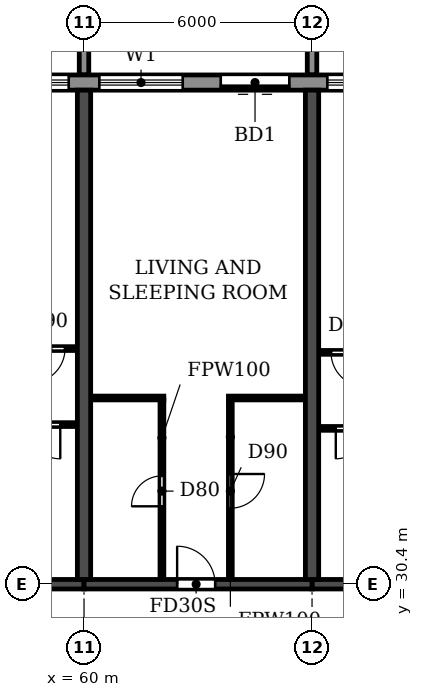
"""IFC4 building model, lengths in metres.
Left out: names, types, materials, properties, quantities, classifications, styles, units other than length and angle.
Written with IfcOpenShell. Run it as: python <this file> out.ifc"""

import sys

from ifc_helpers import new_model, si_unit, direction, frame, frame_2d, origin, place, context, subcontext, project, spatial, polyline, rectangle, outline, extrude, source, transform, mapped, element, fill, save


model = new_model("IFC4")
c1 = context("Model", 3, precision=1e-05, world=origin(), true_north=direction((0.0, 1.0)))
c2 = subcontext(c1, "Body", "Model", "MODEL_VIEW")
j1 = project(units=[si_unit("LENGTHUNIT", "METRE"), si_unit("PLANEANGLEUNIT", "RADIAN")], contexts=[c1])
p1 = place(None, origin())
s1 = spatial("IfcSite", under=j1, at=p1, CompositionType="ELEMENT")
p2 = place(p1, origin())
s2 = spatial("IfcBuilding", under=s1, at=p2, CompositionType="ELEMENT")
p3 = place(p2, frame((0.0, 0.0, 109.2)))
s3 = spatial("IfcBuildingStorey", under=s2, at=p3, CompositionType="ELEMENT", Elevation=109.2)
for number, where, z_axis, x_axis in (
    (1, (60.0, 30.525, 0.0), (0.0, 0.0, 1.0), (0.0, 1.0, 0.0)),
    (2, (66.0, 30.525, 0.0), (0.0, 0.0, 1.0), (0.0, 1.0, 0.0)),
):
    element("IfcWall", number, at=place(p3, frame(where, z_axis=z_axis, x_axis=x_axis)), inside=s3, PredefinedType="SHEAR", context=c2, shape_type="SweptSolid", body=[
        extrude(rectangle(XDim=12.875, YDim=0.35, at=frame_2d((6.438, 0.0))), origin(), (0.0, 0.0, 1.0), 3.06),
    ])
p4 = place(p3, frame((54.0, 30.4, 0.0), z_axis=(0.0, 0.0, 1.0), x_axis=(1.0, 0.0, 0.0)))
e3 = element("IfcWall", 3, at=p4, inside=s3, PredefinedType="SHEAR", context=c2, shape_type="SweptSolid", body=[
    extrude(rectangle(XDim=6.0, YDim=0.25, at=frame_2d((3.0, 0.0))), origin(), (0.0, 0.0, 1.0), 2.46),
])
p5 = place(p4, frame((2.45, 0.0, 0.0)))
e4 = element("IfcOpeningElement", 4, at=p5, cuts=e3, PredefinedType="OPENING", context=c2, shape_type="SweptSolid", body=[
    extrude(rectangle(XDim=1.0, YDim=2.1, at=frame_2d((0.5, 1.05))), frame((0.0, 0.135, 0.0), z_axis=(0.0, -1.0, 0.0), x_axis=(1.0, 0.0, 0.0)), (0.0, 0.0, 1.0), 0.27),
])
p6 = place(p3, frame((60.0, 30.4, 0.0), z_axis=(0.0, 0.0, 1.0), x_axis=(1.0, 0.0, 0.0)))
e5 = element("IfcWall", 5, at=p6, inside=s3, PredefinedType="SHEAR", context=c2, shape_type="SweptSolid", body=[
    extrude(rectangle(XDim=6.0, YDim=0.25, at=frame_2d((3.0, 0.0))), origin(), (0.0, 0.0, 1.0), 2.46),
])
p7 = place(p6, frame((2.45, 0.0, 0.0)))
e6 = element("IfcOpeningElement", 6, at=p7, cuts=e5, PredefinedType="OPENING", context=c2, shape_type="SweptSolid", body=[
    extrude(rectangle(XDim=1.0, YDim=2.1, at=frame_2d((0.5, 1.05))), frame((0.0, 0.135, 0.0), z_axis=(0.0, -1.0, 0.0), x_axis=(1.0, 0.0, 0.0)), (0.0, 0.0, 1.0), 0.27),
])
p8 = place(p3, frame((66.0, 30.4, 0.0), z_axis=(0.0, 0.0, 1.0), x_axis=(1.0, 0.0, 0.0)))
e7 = element("IfcWall", 7, at=p8, inside=s3, PredefinedType="SHEAR", context=c2, shape_type="SweptSolid", body=[
    extrude(rectangle(XDim=6.0, YDim=0.25, at=frame_2d((3.0, 0.0))), origin(), (0.0, 0.0, 1.0), 2.46),
])
p9 = place(p8, frame((2.45, 0.0, 0.0)))
e8 = element("IfcOpeningElement", 8, at=p9, cuts=e7, PredefinedType="OPENING", context=c2, shape_type="SweptSolid", body=[
    extrude(rectangle(XDim=1.0, YDim=2.1, at=frame_2d((0.5, 1.05))), frame((0.0, 0.135, 0.0), z_axis=(0.0, -1.0, 0.0), x_axis=(1.0, 0.0, 0.0)), (0.0, 0.0, 1.0), 0.27),
])
p10 = place(p3, frame((85.317, 43.6, 0.0), z_axis=(0.0, 0.0, 1.0), x_axis=(-1.0, 0.0, 0.0)))
e9 = element("IfcWall", 9, at=p10, inside=s3, PredefinedType="STANDARD", context=c2, shape_type="SweptSolid", body=[
    extrude(rectangle(XDim=68.634, YDim=0.4, at=frame_2d((34.317, 0.0))), origin(), (0.0, 0.0, 1.0), 3.06),
])
p11 = place(p10, frame((64.917, 0.0, 0.0)))
e10 = element("IfcOpeningElement", 10, at=p11, cuts=e9, PredefinedType="OPENING", context=c2, shape_type="SweptSolid", body=[
    extrude(rectangle(XDim=1.8, YDim=2.4, at=frame_2d((0.9, 1.2))), frame((0.0, 0.21, 0.0), z_axis=(0.0, -1.0, 0.0), x_axis=(1.0, 0.0, 0.0)), (0.0, 0.0, 1.0), 0.42),
])
p12 = place(p10, frame((61.717, 0.0, 0.9)))
e11 = element("IfcOpeningElement", 11, at=p12, cuts=e9, PredefinedType="OPENING", context=c2, shape_type="SweptSolid", body=[
    extrude(rectangle(XDim=2.2, YDim=1.5, at=frame_2d((1.1, 0.75))), frame((0.0, 0.21, 0.0), z_axis=(0.0, -1.0, 0.0), x_axis=(1.0, 0.0, 0.0)), (0.0, 0.0, 1.0), 0.42),
])
p13 = place(p10, frame((58.717, 0.0, 0.9)))
e12 = element("IfcOpeningElement", 12, at=p13, cuts=e9, PredefinedType="OPENING", context=c2, shape_type="SweptSolid", body=[
    extrude(rectangle(XDim=2.2, YDim=1.5, at=frame_2d((1.1, 0.75))), frame((0.0, 0.21, 0.0), z_axis=(0.0, -1.0, 0.0), x_axis=(1.0, 0.0, 0.0)), (0.0, 0.0, 1.0), 0.42),
])
p14 = place(p10, frame((55.917, 0.0, 0.0)))
e13 = element("IfcOpeningElement", 13, at=p14, cuts=e9, PredefinedType="OPENING", context=c2, shape_type="SweptSolid", body=[
    extrude(rectangle(XDim=1.8, YDim=2.4, at=frame_2d((0.9, 1.2))), frame((0.0, 0.21, 0.0), z_axis=(0.0, -1.0, 0.0), x_axis=(1.0, 0.0, 0.0)), (0.0, 0.0, 1.0), 0.42),
])
p15 = place(p10, frame((52.917, 0.0, 0.0)))
e14 = element("IfcOpeningElement", 14, at=p15, cuts=e9, PredefinedType="OPENING", context=c2, shape_type="SweptSolid", body=[
    extrude(rectangle(XDim=1.8, YDim=2.4, at=frame_2d((0.9, 1.2))), frame((0.0, 0.21, 0.0), z_axis=(0.0, -1.0, 0.0), x_axis=(1.0, 0.0, 0.0)), (0.0, 0.0, 1.0), 0.42),
])
p16 = place(p10, frame((49.717, 0.0, 0.9)))
e15 = element("IfcOpeningElement", 15, at=p16, cuts=e9, PredefinedType="OPENING", context=c2, shape_type="SweptSolid", body=[
    extrude(rectangle(XDim=2.2, YDim=1.5, at=frame_2d((1.1, 0.75))), frame((0.0, 0.21, 0.0), z_axis=(0.0, -1.0, 0.0), x_axis=(1.0, 0.0, 0.0)), (0.0, 0.0, 1.0), 0.42),
])
p17 = place(p10, frame((46.717, 0.0, 0.9)))
e16 = element("IfcOpeningElement", 16, at=p17, cuts=e9, PredefinedType="OPENING", context=c2, shape_type="SweptSolid", body=[
    extrude(rectangle(XDim=2.2, YDim=1.5, at=frame_2d((1.1, 0.75))), frame((0.0, 0.21, 0.0), z_axis=(0.0, -1.0, 0.0), x_axis=(1.0, 0.0, 0.0)), (0.0, 0.0, 1.0), 0.42),
])
p18 = place(p10, frame((43.917, 0.0, 0.0)))
e17 = element("IfcOpeningElement", 17, at=p18, cuts=e9, PredefinedType="OPENING", context=c2, shape_type="SweptSolid", body=[
    extrude(rectangle(XDim=1.8, YDim=2.4, at=frame_2d((0.9, 1.2))), frame((0.0, 0.21, 0.0), z_axis=(0.0, -1.0, 0.0), x_axis=(1.0, 0.0, 0.0)), (0.0, 0.0, 1.0), 0.42),
])
p19 = place(p10, frame((40.717, 0.0, 0.9)))
e18 = element("IfcOpeningElement", 18, at=p19, cuts=e9, PredefinedType="OPENING", context=c2, shape_type="SweptSolid", body=[
    extrude(rectangle(XDim=2.2, YDim=1.5, at=frame_2d((1.1, 0.75))), frame((0.0, 0.21, 0.0), z_axis=(0.0, -1.0, 0.0), x_axis=(1.0, 0.0, 0.0)), (0.0, 0.0, 1.0), 0.42),
])
p20 = place(p10, frame((37.717, 0.0, 0.9)))
e19 = element("IfcOpeningElement", 19, at=p20, cuts=e9, PredefinedType="OPENING", context=c2, shape_type="SweptSolid", body=[
    extrude(rectangle(XDim=2.2, YDim=1.5, at=frame_2d((1.1, 0.75))), frame((0.0, 0.21, 0.0), z_axis=(0.0, -1.0, 0.0), x_axis=(1.0, 0.0, 0.0)), (0.0, 0.0, 1.0), 0.42),
])
p21 = place(p10, frame((34.917, 0.0, 0.0)))
e20 = element("IfcOpeningElement", 20, at=p21, cuts=e9, PredefinedType="OPENING", context=c2, shape_type="SweptSolid", body=[
    extrude(rectangle(XDim=1.8, YDim=2.4, at=frame_2d((0.9, 1.2))), frame((0.0, 0.21, 0.0), z_axis=(0.0, -1.0, 0.0), x_axis=(1.0, 0.0, 0.0)), (0.0, 0.0, 1.0), 0.42),
])
p22 = place(p10, frame((31.717, 0.0, 0.9)))
e21 = element("IfcOpeningElement", 21, at=p22, cuts=e9, PredefinedType="OPENING", context=c2, shape_type="SweptSolid", body=[
    extrude(rectangle(XDim=2.2, YDim=1.5, at=frame_2d((1.1, 0.75))), frame((0.0, 0.21, 0.0), z_axis=(0.0, -1.0, 0.0), x_axis=(1.0, 0.0, 0.0)), (0.0, 0.0, 1.0), 0.42),
])
p23 = place(p10, frame((28.917, 0.0, 0.0)))
e22 = element("IfcOpeningElement", 22, at=p23, cuts=e9, PredefinedType="OPENING", context=c2, shape_type="SweptSolid", body=[
    extrude(rectangle(XDim=1.8, YDim=2.4, at=frame_2d((0.9, 1.2))), frame((0.0, 0.21, 0.0), z_axis=(0.0, -1.0, 0.0), x_axis=(1.0, 0.0, 0.0)), (0.0, 0.0, 1.0), 0.42),
])
p24 = place(p10, frame((25.717, 0.0, 0.9)))
e23 = element("IfcOpeningElement", 23, at=p24, cuts=e9, PredefinedType="OPENING", context=c2, shape_type="SweptSolid", body=[
    extrude(rectangle(XDim=2.2, YDim=1.5, at=frame_2d((1.1, 0.75))), frame((0.0, 0.21, 0.0), z_axis=(0.0, -1.0, 0.0), x_axis=(1.0, 0.0, 0.0)), (0.0, 0.0, 1.0), 0.42),
])
p25 = place(p10, frame((22.717, 0.0, 0.9)))
e24 = element("IfcOpeningElement", 24, at=p25, cuts=e9, PredefinedType="OPENING", context=c2, shape_type="SweptSolid", body=[
    extrude(rectangle(XDim=2.2, YDim=1.5, at=frame_2d((1.1, 0.75))), frame((0.0, 0.21, 0.0), z_axis=(0.0, -1.0, 0.0), x_axis=(1.0, 0.0, 0.0)), (0.0, 0.0, 1.0), 0.42),
])
p26 = place(p10, frame((19.917, 0.0, 0.0)))
e25 = element("IfcOpeningElement", 25, at=p26, cuts=e9, PredefinedType="OPENING", context=c2, shape_type="SweptSolid", body=[
    extrude(rectangle(XDim=1.8, YDim=2.4, at=frame_2d((0.9, 1.2))), frame((0.0, 0.21, 0.0), z_axis=(0.0, -1.0, 0.0), x_axis=(1.0, 0.0, 0.0)), (0.0, 0.0, 1.0), 0.42),
])
p27 = place(p10, frame((16.717, 0.0, 0.9)))
e26 = element("IfcOpeningElement", 26, at=p27, cuts=e9, PredefinedType="OPENING", context=c2, shape_type="SweptSolid", body=[
    extrude(rectangle(XDim=2.2, YDim=1.5, at=frame_2d((1.1, 0.75))), frame((0.0, 0.21, 0.0), z_axis=(0.0, -1.0, 0.0), x_axis=(1.0, 0.0, 0.0)), (0.0, 0.0, 1.0), 0.42),
])
p28 = place(p10, frame((13.917, 0.0, 0.0)))
e27 = element("IfcOpeningElement", 27, at=p28, cuts=e9, PredefinedType="OPENING", context=c2, shape_type="SweptSolid", body=[
    extrude(rectangle(XDim=1.8, YDim=2.4, at=frame_2d((0.9, 1.2))), frame((0.0, 0.21, 0.0), z_axis=(0.0, -1.0, 0.0), x_axis=(1.0, 0.0, 0.0)), (0.0, 0.0, 1.0), 0.42),
])
p29 = place(p10, frame((10.717, 0.0, 0.9)))
e28 = element("IfcOpeningElement", 28, at=p29, cuts=e9, PredefinedType="OPENING", context=c2, shape_type="SweptSolid", body=[
    extrude(rectangle(XDim=2.2, YDim=1.5, at=frame_2d((1.1, 0.75))), frame((0.0, 0.21, 0.0), z_axis=(0.0, -1.0, 0.0), x_axis=(1.0, 0.0, 0.0)), (0.0, 0.0, 1.0), 0.42),
])
p30 = place(p10, frame((7.717, 0.0, 0.9)))
e29 = element("IfcOpeningElement", 29, at=p30, cuts=e9, PredefinedType="OPENING", context=c2, shape_type="SweptSolid", body=[
    extrude(rectangle(XDim=2.2, YDim=1.5, at=frame_2d((1.1, 0.75))), frame((0.0, 0.21, 0.0), z_axis=(0.0, -1.0, 0.0), x_axis=(1.0, 0.0, 0.0)), (0.0, 0.0, 1.0), 0.42),
])
p31 = place(p10, frame((4.917, 0.0, 0.0)))
e30 = element("IfcOpeningElement", 30, at=p31, cuts=e9, PredefinedType="OPENING", context=c2, shape_type="SweptSolid", body=[
    extrude(rectangle(XDim=1.8, YDim=2.4, at=frame_2d((0.9, 1.2))), frame((0.0, 0.21, 0.0), z_axis=(0.0, -1.0, 0.0), x_axis=(1.0, 0.0, 0.0)), (0.0, 0.0, 1.0), 0.42),
])
p32 = place(p10, frame((1.717, 0.0, 0.9)))
e31 = element("IfcOpeningElement", 31, at=p32, cuts=e9, PredefinedType="OPENING", context=c2, shape_type="SweptSolid", body=[
    extrude(rectangle(XDim=2.2, YDim=1.5, at=frame_2d((1.1, 0.75))), frame((0.0, 0.21, 0.0), z_axis=(0.0, -1.0, 0.0), x_axis=(1.0, 0.0, 0.0)), (0.0, 0.0, 1.0), 0.42),
])
m1 = source(origin(), c2, "Body", "SweptSolid", [
    extrude(outline(polyline([(0.0, 0.0), (0.25, 0.0), (0.25, 3.1), (0.0, 3.1), (0.0, 0.0)])), origin(), (0.0, 0.0, 1.0), 3.1),
])
for number, where in (
    (32, (59.875, 43.8, 0.0)),
    (33, (65.875, 43.8, 0.0)),
):
    element("IfcWall", number, at=place(p3, frame(where)), inside=s3, PredefinedType="STANDARD", context=c2, shape_type="MappedRepresentation", body=[
        mapped(m1, transform((0.0, 0.0, 0.0))),
    ])
p33 = place(p3, frame((66.185, 34.5, 0.0), z_axis=(0.0, 0.0, 1.0), x_axis=(1.0, 0.0, 0.0)))
e34 = element("IfcWall", 34, at=p33, inside=s3, PredefinedType="PARTITIONING", context=c2, shape_type="SweptSolid", body=[
    extrude(rectangle(XDim=1.915, YDim=0.1, at=frame_2d((0.958, 0.0))), origin(), (0.0, 0.0, 1.0), 3.06),
])
p34 = place(p33, frame((0.44, 0.0, 0.0)))
e35 = element("IfcOpeningElement", 35, at=p34, cuts=e34, PredefinedType="OPENING", context=c2, shape_type="SweptSolid", body=[
    extrude(rectangle(XDim=0.8, YDim=2.1, at=frame_2d((0.4, 1.05))), frame((0.0, 0.06, 0.0), z_axis=(0.0, -1.0, 0.0), x_axis=(1.0, 0.0, 0.0)), (0.0, 0.0, 1.0), 0.12),
])
p35 = place(p3, frame((57.8, 34.6, 0.0), z_axis=(0.0, 0.0, 1.0), x_axis=(1.0, 0.0, 0.0)))
e36 = element("IfcWall", 36, at=p35, inside=s3, PredefinedType="PARTITIONING", context=c2, shape_type="SweptSolid", body=[
    extrude(rectangle(XDim=2.015, YDim=0.1, at=frame_2d((1.007, 0.0))), origin(), (0.0, 0.0, 1.0), 3.06),
])
p36 = place(p35, frame((0.675, 0.0, 0.0)))
e37 = element("IfcOpeningElement", 37, at=p36, cuts=e36, PredefinedType="OPENING", context=c2, shape_type="SweptSolid", body=[
    extrude(rectangle(XDim=0.9, YDim=2.1, at=frame_2d((0.45, 1.05))), frame((0.0, 0.06, 0.0), z_axis=(0.0, -1.0, 0.0), x_axis=(1.0, 0.0, 0.0)), (0.0, 0.0, 1.0), 0.12),
])
p37 = place(p3, frame((60.185, 35.3, 0.0), z_axis=(0.0, 0.0, 1.0), x_axis=(1.0, 0.0, 0.0)))
e38 = element("IfcWall", 38, at=p37, inside=s3, PredefinedType="PARTITIONING", context=c2, shape_type="SweptSolid", body=[
    extrude(rectangle(XDim=1.915, YDim=0.1, at=frame_2d((0.958, 0.0))), origin(), (0.0, 0.0, 1.0), 3.06),
])
p38 = place(p3, frame((63.8, 35.3, 0.0), z_axis=(0.0, 0.0, 1.0), x_axis=(1.0, 0.0, 0.0)))
e39 = element("IfcWall", 39, at=p38, inside=s3, PredefinedType="PARTITIONING", context=c2, shape_type="SweptSolid", body=[
    extrude(rectangle(XDim=2.015, YDim=0.1, at=frame_2d((1.007, 0.0))), origin(), (0.0, 0.0, 1.0), 3.06),
])
p39 = place(p3, frame((66.185, 36.5, 0.0), z_axis=(0.0, 0.0, 1.0), x_axis=(1.0, 0.0, 0.0)))
e40 = element("IfcWall", 40, at=p39, inside=s3, PredefinedType="PARTITIONING", context=c2, shape_type="SweptSolid", body=[
    extrude(rectangle(XDim=2.865, YDim=0.1, at=frame_2d((1.433, 0.0))), origin(), (0.0, 0.0, 1.0), 3.06),
])
p40 = place(p39, frame((0.315, 0.0, 0.0)))
e41 = element("IfcOpeningElement", 41, at=p40, cuts=e40, PredefinedType="OPENING", context=c2, shape_type="SweptSolid", body=[
    extrude(rectangle(XDim=0.9, YDim=2.1, at=frame_2d((0.45, 1.05))), frame((0.0, 0.06, 0.0), z_axis=(0.0, -1.0, 0.0), x_axis=(1.0, 0.0, 0.0)), (0.0, 0.0, 1.0), 0.12),
])
p41 = place(p3, frame((56.95, 36.6, 0.0), z_axis=(0.0, 0.0, 1.0), x_axis=(1.0, 0.0, 0.0)))
e42 = element("IfcWall", 42, at=p41, inside=s3, PredefinedType="PARTITIONING", context=c2, shape_type="SweptSolid", body=[
    extrude(rectangle(XDim=2.865, YDim=0.1, at=frame_2d((1.433, 0.0))), origin(), (0.0, 0.0, 1.0), 3.06),
])
p42 = place(p41, frame((1.65, 0.0, 0.0)))
e43 = element("IfcOpeningElement", 43, at=p42, cuts=e42, PredefinedType="OPENING", context=c2, shape_type="SweptSolid", body=[
    extrude(rectangle(XDim=0.9, YDim=2.1, at=frame_2d((0.45, 1.05))), frame((0.0, 0.06, 0.0), z_axis=(0.0, -1.0, 0.0), x_axis=(1.0, 0.0, 0.0)), (0.0, 0.0, 1.0), 0.12),
])
p43 = place(p3, frame((62.05, 30.535, 0.0), z_axis=(0.0, 0.0, 1.0), x_axis=(0.0, 1.0, 0.0)))
e44 = element("IfcWall", 44, at=p43, inside=s3, PredefinedType="PARTITIONING", context=c2, shape_type="SweptSolid", body=[
    extrude(rectangle(XDim=4.715, YDim=0.1, at=frame_2d((2.357, 0.0))), origin(), (0.0, 0.0, 1.0), 3.06),
])
p44 = place(p43, frame((1.915, 0.0, 0.0)))
e45 = element("IfcOpeningElement", 45, at=p44, cuts=e44, PredefinedType="OPENING", context=c2, shape_type="SweptSolid", body=[
    extrude(rectangle(XDim=0.8, YDim=2.1, at=frame_2d((0.4, 1.05))), frame((0.0, 0.06, 0.0), z_axis=(0.0, -1.0, 0.0), x_axis=(1.0, 0.0, 0.0)), (0.0, 0.0, 1.0), 0.12),
])
p45 = place(p3, frame((63.85, 30.535, 0.0), z_axis=(0.0, 0.0, 1.0), x_axis=(0.0, 1.0, 0.0)))
e46 = element("IfcWall", 46, at=p45, inside=s3, PredefinedType="PARTITIONING", context=c2, shape_type="SweptSolid", body=[
    extrude(rectangle(XDim=4.715, YDim=0.1, at=frame_2d((2.357, 0.0))), origin(), (0.0, 0.0, 1.0), 3.06),
])
p46 = place(p45, frame((1.865, 0.0, 0.0)))
e47 = element("IfcOpeningElement", 47, at=p46, cuts=e46, PredefinedType="OPENING", context=c2, shape_type="SweptSolid", body=[
    extrude(rectangle(XDim=0.9, YDim=2.1, at=frame_2d((0.45, 1.05))), frame((0.0, 0.06, 0.0), z_axis=(0.0, -1.0, 0.0), x_axis=(1.0, 0.0, 0.0)), (0.0, 0.0, 1.0), 0.12),
])
p47 = place(p24, origin())
e48 = element("IfcWindow", 48, at=p47, inside=s3, PartitioningType="DOUBLE_PANEL_HORIZONTAL", PredefinedType="WINDOW", context=c2, shape_type="SweptSolid", body=[
    extrude(rectangle(XDim=2.2, YDim=1.5, at=frame_2d((1.1, 0.75))), frame((0.0, 0.03, 0.0), z_axis=(0.0, -1.0, 0.0), x_axis=(1.0, 0.0, 0.0)), (0.0, 0.0, 1.0), 0.06),
])
fill(e23, e48)
p48 = place(p25, origin())
e49 = element("IfcWindow", 49, at=p48, inside=s3, PartitioningType="DOUBLE_PANEL_HORIZONTAL", PredefinedType="WINDOW", context=c2, shape_type="SweptSolid", body=[
    extrude(rectangle(XDim=2.2, YDim=1.5, at=frame_2d((1.1, 0.75))), frame((0.0, 0.03, 0.0), z_axis=(0.0, -1.0, 0.0), x_axis=(1.0, 0.0, 0.0)), (0.0, 0.0, 1.0), 0.06),
])
fill(e24, e49)
p49 = place(p26, origin())
e50 = element("IfcDoor", 50, at=p49, inside=s3, OperationType="DOUBLE_DOOR_SLIDING", PredefinedType="DOOR", context=c2, shape_type="SweptSolid", body=[
    extrude(rectangle(XDim=1.8, YDim=2.4, at=frame_2d((0.9, 1.2))), frame((0.0, 0.025, 0.0), z_axis=(0.0, -1.0, 0.0), x_axis=(1.0, 0.0, 0.0)), (0.0, 0.0, 1.0), 0.05),
])
fill(e25, e50)
p50 = place(p27, origin())
e51 = element("IfcWindow", 51, at=p50, inside=s3, PartitioningType="DOUBLE_PANEL_HORIZONTAL", PredefinedType="WINDOW", context=c2, shape_type="SweptSolid", body=[
    extrude(rectangle(XDim=2.2, YDim=1.5, at=frame_2d((1.1, 0.75))), frame((0.0, 0.03, 0.0), z_axis=(0.0, -1.0, 0.0), x_axis=(1.0, 0.0, 0.0)), (0.0, 0.0, 1.0), 0.06),
])
fill(e26, e51)
p51 = place(p36, frame((0.9, 0.0, 0.0), z_axis=(0.0, 0.0, 1.0), x_axis=(-1.0, 0.0, 0.0)))
e52 = element("IfcDoor", 52, at=p51, inside=s3, OperationType="SINGLE_SWING_LEFT", PredefinedType="DOOR", context=c2, shape_type="SweptSolid", body=[
    extrude(rectangle(XDim=0.9, YDim=2.1, at=frame_2d((0.45, 1.05))), frame((0.0, 0.025, 0.0), z_axis=(0.0, -1.0, 0.0), x_axis=(1.0, 0.0, 0.0)), (0.0, 0.0, 1.0), 0.05),
])
fill(e37, e52)
p52 = place(p42, frame((0.9, 0.0, 0.0), z_axis=(0.0, 0.0, 1.0), x_axis=(-1.0, 0.0, 0.0)))
e53 = element("IfcDoor", 53, at=p52, inside=s3, OperationType="SINGLE_SWING_RIGHT", PredefinedType="DOOR", context=c2, shape_type="SweptSolid", body=[
    extrude(rectangle(XDim=0.9, YDim=2.1, at=frame_2d((0.45, 1.05))), frame((0.0, 0.025, 0.0), z_axis=(0.0, -1.0, 0.0), x_axis=(1.0, 0.0, 0.0)), (0.0, 0.0, 1.0), 0.05),
])
fill(e43, e53)
p53 = place(p44, origin())
e54 = element("IfcDoor", 54, at=p53, inside=s3, OperationType="SINGLE_SWING_LEFT", PredefinedType="DOOR", context=c2, shape_type="SweptSolid", body=[
    extrude(rectangle(XDim=0.8, YDim=2.1, at=frame_2d((0.4, 1.05))), frame((0.0, 0.025, 0.0), z_axis=(0.0, -1.0, 0.0), x_axis=(1.0, 0.0, 0.0)), (0.0, 0.0, 1.0), 0.05),
])
fill(e45, e54)
p54 = place(p7, origin())
e55 = element("IfcDoor", 55, at=p54, inside=s3, OperationType="SINGLE_SWING_LEFT", PredefinedType="DOOR", context=c2, shape_type="SweptSolid", body=[
    extrude(rectangle(XDim=1.0, YDim=2.1, at=frame_2d((0.5, 1.05))), frame((0.0, 0.025, 0.0), z_axis=(0.0, -1.0, 0.0), x_axis=(1.0, 0.0, 0.0)), (0.0, 0.0, 1.0), 0.05),
])
fill(e6, e55)
p55 = place(p46, frame((0.9, 0.0, 0.0), z_axis=(0.0, 0.0, 1.0), x_axis=(-1.0, 0.0, 0.0)))
e56 = element("IfcDoor", 56, at=p55, inside=s3, OperationType="SINGLE_SWING_LEFT", PredefinedType="DOOR", context=c2, shape_type="SweptSolid", body=[
    extrude(rectangle(XDim=0.9, YDim=2.1, at=frame_2d((0.45, 1.05))), frame((0.0, 0.025, 0.0), z_axis=(0.0, -1.0, 0.0), x_axis=(1.0, 0.0, 0.0)), (0.0, 0.0, 1.0), 0.05),
])
fill(e47, e56)
p56 = place(p40, frame((0.9, 0.0, 0.0), z_axis=(0.0, 0.0, 1.0), x_axis=(-1.0, 0.0, 0.0)))
e57 = element("IfcDoor", 57, at=p56, inside=s3, OperationType="SINGLE_SWING_LEFT", PredefinedType="DOOR", context=c2, shape_type="SweptSolid", body=[
    extrude(rectangle(XDim=0.9, YDim=2.1, at=frame_2d((0.45, 1.05))), frame((0.0, 0.025, 0.0), z_axis=(0.0, -1.0, 0.0), x_axis=(1.0, 0.0, 0.0)), (0.0, 0.0, 1.0), 0.05),
])
fill(e41, e57)
p57 = place(p34, frame((0.8, 0.0, 0.0), z_axis=(0.0, 0.0, 1.0), x_axis=(-1.0, 0.0, 0.0)))
e58 = element("IfcDoor", 58, at=p57, inside=s3, OperationType="SINGLE_SWING_RIGHT", PredefinedType="DOOR", context=c2, shape_type="SweptSolid", body=[
    extrude(rectangle(XDim=0.8, YDim=2.1, at=frame_2d((0.4, 1.05))), frame((0.0, 0.025, 0.0), z_axis=(0.0, -1.0, 0.0), x_axis=(1.0, 0.0, 0.0)), (0.0, 0.0, 1.0), 0.05),
])
fill(e35, e58)
save(model, sys.argv[1])
